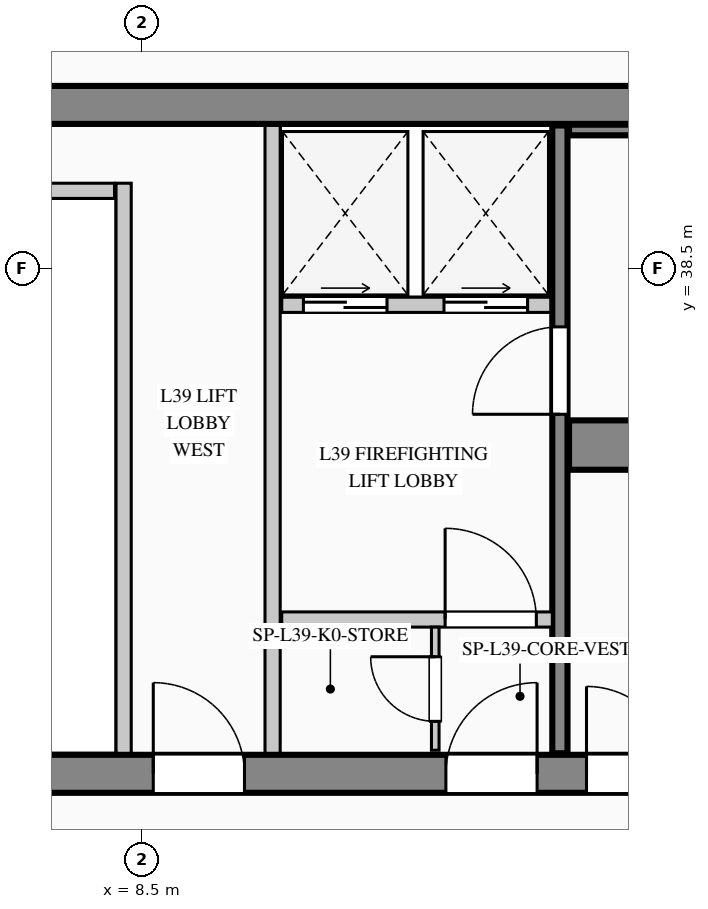
"""IFC4 building model, lengths in metres.
Left out: names, types, materials, properties, quantities, classifications, styles, units other than length and angle.
Written with IfcOpenShell. Run it as: python <this file> out.ifc"""

import sys

from ifc_helpers import new_model, si_unit, direction, frame, frame_2d, origin, place, context, subcontext, project, spatial, rectangle, extrude, element, fill, save


model = new_model("IFC4")
c1 = context("Model", 3, precision=1e-05, world=origin(), true_north=direction((0.0, 1.0)))
c2 = subcontext(c1, "Body", "Model", "MODEL_VIEW")
j1 = project(units=[si_unit("LENGTHUNIT", "METRE"), si_unit("PLANEANGLEUNIT", "RADIAN")], contexts=[c1])
p1 = place(None, origin())
s1 = spatial("IfcSite", under=j1, at=p1, CompositionType="ELEMENT")
p2 = place(p1, origin())
s2 = spatial("IfcBuilding", under=s1, at=p2, CompositionType="ELEMENT")
p3 = place(p2, frame((0.0, 0.0, 166.7)))
s3 = spatial("IfcBuildingStorey", under=s2, at=p3, CompositionType="ELEMENT", Elevation=166.7)
p4 = place(p3, frame((5.5, 40.65, 0.0), z_axis=(0.0, 0.0, 1.0), x_axis=(1.0, 0.0, 0.0)))
e1 = element("IfcWall", 1, at=p4, inside=s3, PredefinedType="SHEAR", context=c2, shape_type="SweptSolid", body=[
    extrude(rectangle(XDim=17.85, YDim=0.5, at=frame_2d((8.925, 0.0))), origin(), (0.0, 0.0, 1.0), 3.95),
])
p5 = place(p4, frame((15.945, 0.0, 0.0)))
e2 = element("IfcOpeningElement", 2, at=p5, cuts=e1, PredefinedType="OPENING", context=c2, shape_type="SweptSolid", body=[
    extrude(rectangle(XDim=1.18, YDim=2.25, at=frame_2d((0.59, 1.125))), frame((0.0, 0.26, 0.0), z_axis=(0.0, -1.0, 0.0), x_axis=(1.0, 0.0, 0.0)), (0.0, 0.0, 1.0), 0.52),
])
p6 = place(p3, frame((5.5, 31.85, 0.0), z_axis=(0.0, 0.0, 1.0), x_axis=(1.0, 0.0, 0.0)))
e3 = element("IfcWall", 3, at=p6, inside=s3, PredefinedType="SHEAR", context=c2, shape_type="SweptSolid", body=[
    extrude(rectangle(XDim=17.85, YDim=0.5, at=frame_2d((8.925, 0.0))), origin(), (0.0, 0.0, 1.0), 3.95),
])
p7 = place(p6, frame((3.15, 0.0, 0.0)))
e4 = element("IfcOpeningElement", 4, at=p7, cuts=e3, PredefinedType="OPENING", context=c2, shape_type="SweptSolid", body=[
    extrude(rectangle(XDim=1.2, YDim=2.2, at=frame_2d((0.6, 1.1))), frame((0.0, 0.26, 0.0), z_axis=(0.0, -1.0, 0.0), x_axis=(1.0, 0.0, 0.0)), (0.0, 0.0, 1.0), 0.52),
])
p8 = place(p6, frame((7.0, 0.0, 0.0)))
e5 = element("IfcOpeningElement", 5, at=p8, cuts=e3, PredefinedType="OPENING", context=c2, shape_type="SweptSolid", body=[
    extrude(rectangle(XDim=1.2, YDim=2.2, at=frame_2d((0.6, 1.1))), frame((0.0, 0.26, 0.0), z_axis=(0.0, -1.0, 0.0), x_axis=(1.0, 0.0, 0.0)), (0.0, 0.0, 1.0), 0.52),
])
p9 = place(p6, frame((8.85, 0.0, 0.0)))
e6 = element("IfcOpeningElement", 6, at=p9, cuts=e3, PredefinedType="OPENING", context=c2, shape_type="SweptSolid", body=[
    extrude(rectangle(XDim=1.15, YDim=2.2, at=frame_2d((0.575, 1.1))), frame((0.0, 0.26, 0.0), z_axis=(0.0, -1.0, 0.0), x_axis=(1.0, 0.0, 0.0)), (0.0, 0.0, 1.0), 0.52),
])
p10 = place(p6, frame((15.95, 0.0, 0.0)))
e7 = element("IfcOpeningElement", 7, at=p10, cuts=e3, PredefinedType="OPENING", context=c2, shape_type="SweptSolid", body=[
    extrude(rectangle(XDim=1.2, YDim=2.2, at=frame_2d((0.6, 1.1))), frame((0.0, 0.26, 0.0), z_axis=(0.0, -1.0, 0.0), x_axis=(1.0, 0.0, 0.0)), (0.0, 0.0, 1.0), 0.52),
])
p11 = place(p3, frame((14.0, 32.12, 0.0), z_axis=(0.0, 0.0, 1.0), x_axis=(0.0, 1.0, 0.0)))
e8 = element("IfcWall", 8, at=p11, inside=s3, PredefinedType="SHEAR", context=c2, shape_type="SweptSolid", body=[
    extrude(rectangle(XDim=8.26, YDim=0.2, at=frame_2d((4.13, 0.0))), origin(), (0.0, 0.0, 1.0), 3.95),
])
p12 = place(p11, frame((4.46, 0.0, 0.0)))
e9 = element("IfcOpeningElement", 9, at=p12, cuts=e8, PredefinedType="OPENING", context=c2, shape_type="SweptSolid", body=[
    extrude(rectangle(XDim=1.15, YDim=2.2, at=frame_2d((0.575, 1.1))), frame((0.0, 0.11, 0.0), z_axis=(0.0, -1.0, 0.0), x_axis=(1.0, 0.0, 0.0)), (0.0, 0.0, 1.0), 0.22),
])
p13 = place(p3, frame((14.12, 36.175, 0.0), z_axis=(0.0, 0.0, 1.0), x_axis=(1.0, 0.0, 0.0)))
e10 = element("IfcWall", 10, at=p13, inside=s3, PredefinedType="SHEAR", context=c2, shape_type="SweptSolid", body=[
    extrude(rectangle(XDim=7.01, YDim=0.65, at=frame_2d((3.505, 0.0))), origin(), (0.0, 0.0, 1.0), 3.95),
])
p14 = place(p3, frame((14.12, 40.32, 0.0), z_axis=(0.0, 0.0, 1.0), x_axis=(1.0, 0.0, 0.0)))
e11 = element("IfcWall", 11, at=p14, inside=s3, PredefinedType="SHEAR", context=c2, shape_type="SweptSolid", body=[
    extrude(rectangle(XDim=7.01, YDim=0.14, at=frame_2d((3.505, 0.0))), origin(), (0.0, 0.0, 1.0), 3.95),
])
p15 = place(p3, frame((7.993, 4.73, 0.0), z_axis=(0.0, 0.0, 1.0), x_axis=(-0.136989009016, 0.990572567462, 0.0)))
e12 = element("IfcWall", 12, at=p15, inside=s3, PredefinedType="STANDARD", context=c2, shape_type="SweptSolid", body=[
    extrude(rectangle(XDim=36.888, YDim=0.26, at=frame_2d((18.444, 0.0))), origin(), (0.0, 0.0, 1.0), 3.69),
])
p16 = place(p15, frame((20.748, 0.0, 0.9)))
e13 = element("IfcOpeningElement", 13, at=p16, cuts=e12, PredefinedType="OPENING", context=c2, shape_type="SweptSolid", body=[
    extrude(rectangle(XDim=2.1, YDim=2.0, at=frame_2d((1.05, 1.0))), frame((0.0, 0.14, 0.0), z_axis=(0.0, -1.0, 0.0), x_axis=(1.0, 0.0, 0.0)), (0.0, 0.0, 1.0), 0.28),
])
p17 = place(p3, frame((8.26, 32.12, 0.0), z_axis=(0.0, 0.0, 1.0), x_axis=(0.0, 1.0, 0.0)))
e14 = element("IfcWall", 14, at=p17, inside=s3, PredefinedType="PARTITIONING", context=c2, shape_type="SweptSolid", body=[
    extrude(rectangle(XDim=7.5, YDim=0.2, at=frame_2d((3.75, 0.0))), origin(), (0.0, 0.0, 1.0), 3.69),
])
p18 = place(p3, frame((6.02, 39.52, 0.0), z_axis=(0.0, 0.0, 1.0), x_axis=(1.0, 0.0, 0.0)))
e15 = element("IfcWall", 15, at=p18, inside=s3, PredefinedType="PARTITIONING", context=c2, shape_type="SweptSolid", body=[
    extrude(rectangle(XDim=2.12, YDim=0.2, at=frame_2d((1.06, 0.0))), origin(), (0.0, 0.0, 1.0), 3.69),
])
p19 = place(p3, frame((10.22, 32.12, 0.0), z_axis=(0.0, 0.0, 1.0), x_axis=(0.0, 1.0, 0.0)))
e16 = element("IfcWall", 16, at=p19, inside=s3, PredefinedType="PARTITIONING", context=c2, shape_type="SweptSolid", body=[
    extrude(rectangle(XDim=8.26, YDim=0.2, at=frame_2d((4.13, 0.0))), origin(), (0.0, 0.0, 1.0), 3.69),
])
p20 = place(p3, frame((10.34, 38.02, 0.0), z_axis=(0.0, 0.0, 1.0), x_axis=(1.0, 0.0, 0.0)))
e17 = element("IfcWall", 17, at=p20, inside=s3, PredefinedType="PARTITIONING", context=c2, shape_type="SweptSolid", body=[
    extrude(rectangle(XDim=3.54, YDim=0.2, at=frame_2d((1.77, 0.0))), origin(), (0.0, 0.0, 1.0), 3.69),
])
p21 = place(p20, frame((0.285, 0.0, 0.0)))
e18 = element("IfcOpeningElement", 18, at=p21, cuts=e17, PredefinedType="OPENING", context=c2, shape_type="SweptSolid", body=[
    extrude(rectangle(XDim=1.1, YDim=2.2, at=frame_2d((0.55, 1.1))), frame((0.0, 0.11, 0.0), z_axis=(0.0, -1.0, 0.0), x_axis=(1.0, 0.0, 0.0)), (0.0, 0.0, 1.0), 0.22),
])
p22 = place(p20, frame((2.135, 0.0, 0.0)))
e19 = element("IfcOpeningElement", 19, at=p22, cuts=e17, PredefinedType="OPENING", context=c2, shape_type="SweptSolid", body=[
    extrude(rectangle(XDim=1.1, YDim=2.2, at=frame_2d((0.55, 1.1))), frame((0.0, 0.11, 0.0), z_axis=(0.0, -1.0, 0.0), x_axis=(1.0, 0.0, 0.0)), (0.0, 0.0, 1.0), 0.22),
])
p23 = place(p3, frame((10.34, 33.88, 0.0), z_axis=(0.0, 0.0, 1.0), x_axis=(1.0, 0.0, 0.0)))
e20 = element("IfcWall", 20, at=p23, inside=s3, PredefinedType="PARTITIONING", context=c2, shape_type="SweptSolid", body=[
    extrude(rectangle(XDim=3.56, YDim=0.2, at=frame_2d((1.78, 0.0))), origin(), (0.0, 0.0, 1.0), 3.69),
])
p24 = place(p23, frame((2.15, 0.0, 0.0)))
e21 = element("IfcOpeningElement", 21, at=p24, cuts=e20, PredefinedType="OPENING", context=c2, shape_type="SweptSolid", body=[
    extrude(rectangle(XDim=1.2, YDim=2.2, at=frame_2d((0.6, 1.1))), frame((0.0, 0.11, 0.0), z_axis=(0.0, -1.0, 0.0), x_axis=(1.0, 0.0, 0.0)), (0.0, 0.0, 1.0), 0.22),
])
p25 = place(p3, frame((12.36, 32.16, 0.0), z_axis=(0.0, 0.0, 1.0), x_axis=(0.0, 1.0, 0.0)))
e22 = element("IfcWall", 22, at=p25, inside=s3, PredefinedType="PARTITIONING", context=c2, shape_type="SweptSolid", body=[
    extrude(rectangle(XDim=1.62, YDim=0.1, at=frame_2d((0.81, 0.0))), origin(), (0.0, 0.0, 1.0), 3.69),
])
p26 = place(p25, frame((0.38, 0.0, 0.0)))
e23 = element("IfcOpeningElement", 23, at=p26, cuts=e22, PredefinedType="OPENING", context=c2, shape_type="SweptSolid", body=[
    extrude(rectangle(XDim=0.85, YDim=2.1, at=frame_2d((0.425, 1.05))), frame((0.0, 0.06, 0.0), z_axis=(0.0, -1.0, 0.0), x_axis=(1.0, 0.0, 0.0)), (0.0, 0.0, 1.0), 0.12),
])
p27 = place(p7, origin())
e24 = element("IfcDoor", 24, at=p27, inside=s3, OperationType="SINGLE_SWING_LEFT", PredefinedType="DOOR", context=c2, shape_type="SweptSolid", body=[
    extrude(rectangle(XDim=1.2, YDim=2.2, at=frame_2d((0.6, 1.1))), frame((0.0, 0.025, 0.0), z_axis=(0.0, -1.0, 0.0), x_axis=(1.0, 0.0, 0.0)), (0.0, 0.0, 1.0), 0.05),
])
fill(e4, e24)
p28 = place(p8, origin())
e25 = element("IfcDoor", 25, at=p28, inside=s3, OperationType="SINGLE_SWING_RIGHT", PredefinedType="DOOR", context=c2, shape_type="SweptSolid", body=[
    extrude(rectangle(XDim=1.2, YDim=2.2, at=frame_2d((0.6, 1.1))), frame((0.0, 0.025, 0.0), z_axis=(0.0, -1.0, 0.0), x_axis=(1.0, 0.0, 0.0)), (0.0, 0.0, 1.0), 0.05),
])
fill(e5, e25)
p29 = place(p9, origin())
e26 = element("IfcDoor", 26, at=p29, inside=s3, OperationType="SINGLE_SWING_LEFT", PredefinedType="DOOR", context=c2, shape_type="SweptSolid", body=[
    extrude(rectangle(XDim=1.15, YDim=2.2, at=frame_2d((0.575, 1.1))), frame((0.0, 0.025, 0.0), z_axis=(0.0, -1.0, 0.0), x_axis=(1.0, 0.0, 0.0)), (0.0, 0.0, 1.0), 0.05),
])
fill(e6, e26)
p30 = place(p24, origin())
e27 = element("IfcDoor", 27, at=p30, inside=s3, OperationType="SINGLE_SWING_LEFT", PredefinedType="DOOR", context=c2, shape_type="SweptSolid", body=[
    extrude(rectangle(XDim=1.2, YDim=2.2, at=frame_2d((0.6, 1.1))), frame((0.0, 0.025, 0.0), z_axis=(0.0, -1.0, 0.0), x_axis=(1.0, 0.0, 0.0)), (0.0, 0.0, 1.0), 0.05),
])
fill(e21, e27)
p31 = place(p26, origin())
e28 = element("IfcDoor", 28, at=p31, inside=s3, OperationType="SINGLE_SWING_RIGHT", PredefinedType="DOOR", context=c2, shape_type="SweptSolid", body=[
    extrude(rectangle(XDim=0.85, YDim=2.1, at=frame_2d((0.425, 1.05))), frame((0.0, 0.025, 0.0), z_axis=(0.0, -1.0, 0.0), x_axis=(1.0, 0.0, 0.0)), (0.0, 0.0, 1.0), 0.05),
])
fill(e23, e28)
p32 = place(p12, origin())
e29 = element("IfcDoor", 29, at=p32, inside=s3, OperationType="SINGLE_SWING_LEFT", PredefinedType="DOOR", context=c2, shape_type="SweptSolid", body=[
    extrude(rectangle(XDim=1.15, YDim=2.2, at=frame_2d((0.575, 1.1))), frame((0.0, 0.025, 0.0), z_axis=(0.0, -1.0, 0.0), x_axis=(1.0, 0.0, 0.0)), (0.0, 0.0, 1.0), 0.05),
])
fill(e9, e29)
p33 = place(p21, origin())
e30 = element("IfcDoor", 30, at=p33, inside=s3, OperationType="DOUBLE_DOOR_SLIDING", PredefinedType="DOOR", context=c2, shape_type="SweptSolid", body=[
    extrude(rectangle(XDim=1.1, YDim=2.2, at=frame_2d((0.55, 1.1))), frame((0.0, 0.025, 0.0), z_axis=(0.0, -1.0, 0.0), x_axis=(1.0, 0.0, 0.0)), (0.0, 0.0, 1.0), 0.05),
])
fill(e18, e30)
p34 = place(p22, origin())
e31 = element("IfcDoor", 31, at=p34, inside=s3, OperationType="DOUBLE_DOOR_SLIDING", PredefinedType="DOOR", context=c2, shape_type="SweptSolid", body=[
    extrude(rectangle(XDim=1.1, YDim=2.2, at=frame_2d((0.55, 1.1))), frame((0.0, 0.025, 0.0), z_axis=(0.0, -1.0, 0.0), x_axis=(1.0, 0.0, 0.0)), (0.0, 0.0, 1.0), 0.05),
])
fill(e19, e31)
save(model, sys.argv[1])
